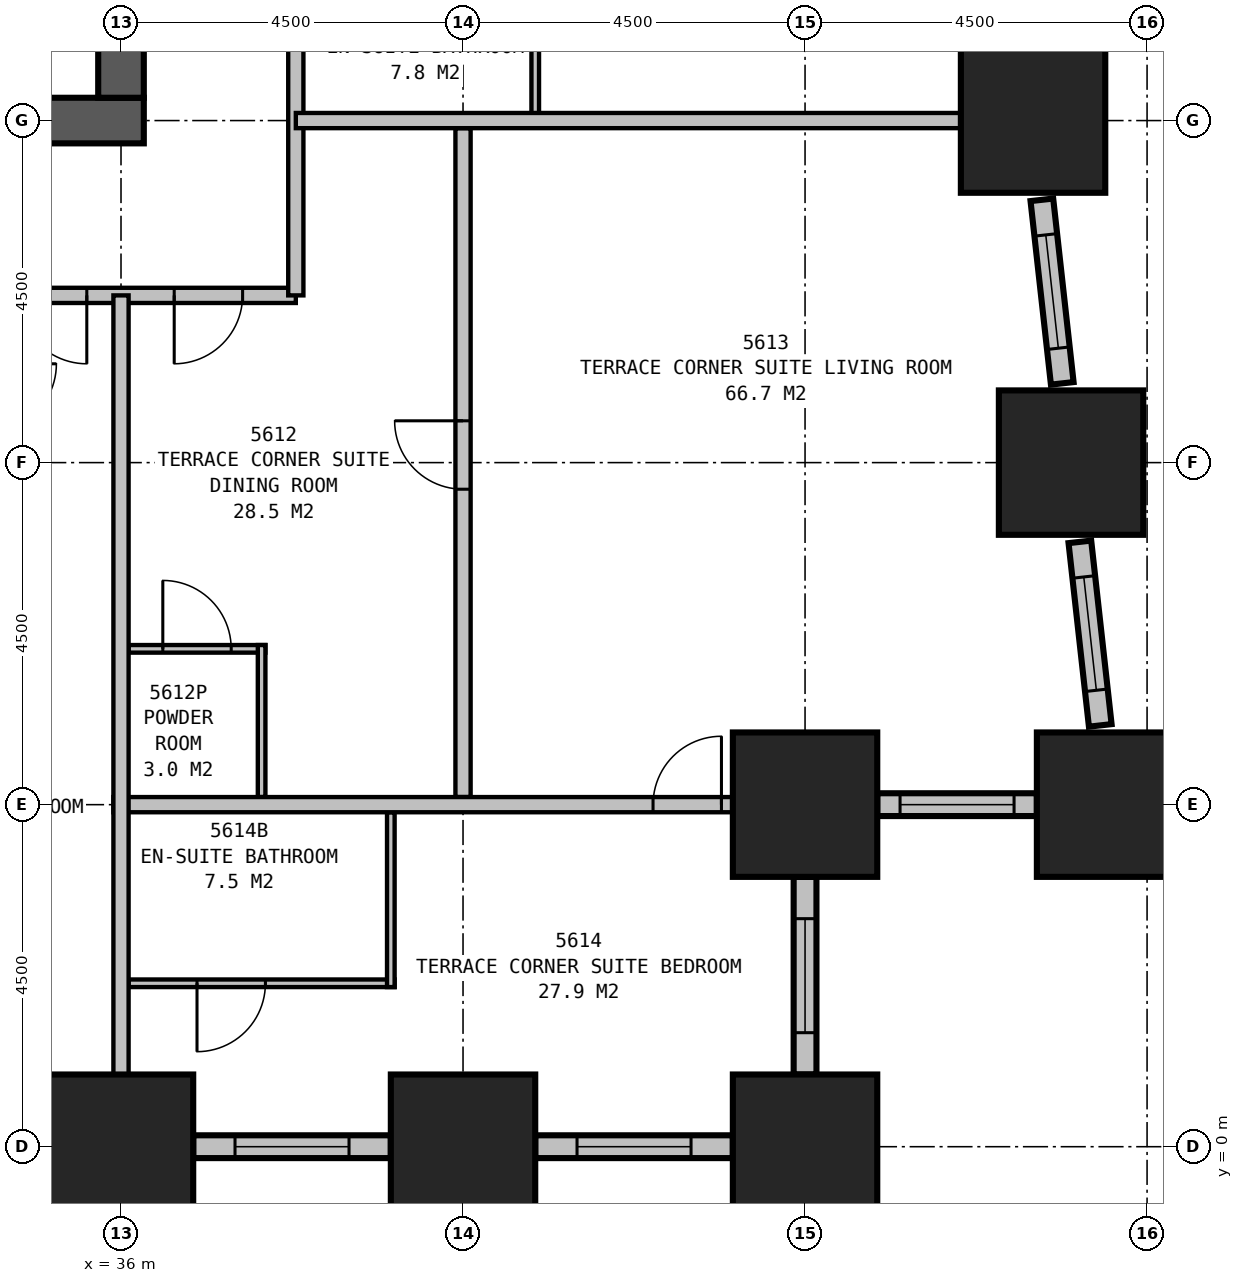
"""IFC4 building model, lengths in metres.
Left out: names, types, materials, properties, quantities, classifications, styles, units other than length and angle.
Written with IfcOpenShell. Run it as: python <this file> out.ifc"""

import sys

from ifc_helpers import new_model, si_unit, direction, frame, frame_2d, origin, origin_2d, place, context, subcontext, project, spatial, rectangle, extrude, element, fill, save


model = new_model("IFC4")
c1 = context("Model", 3, precision=1e-05, world=origin(), true_north=direction((0.0, 1.0)))
c2 = subcontext(c1, "Body", "Model", "MODEL_VIEW")
j1 = project(units=[si_unit("LENGTHUNIT", "METRE"), si_unit("PLANEANGLEUNIT", "RADIAN")], contexts=[c1])
p1 = place(None, origin())
s1 = spatial("IfcSite", under=j1, at=p1, CompositionType="ELEMENT")
p2 = place(p1, origin())
s2 = spatial("IfcBuilding", under=s1, at=p2, CompositionType="ELEMENT")
p3 = place(p2, frame((0.0, 0.0, 217.4)))
s3 = spatial("IfcBuildingStorey", under=s2, at=p3, CompositionType="ELEMENT", Elevation=217.4)
for number, where, z_axis, x_axis in (
    (1, (36.0, 0.0, 0.0), (0.0, 0.0, 1.0), (1.0, 0.0, 0.0)),
    (2, (40.5, 0.0, 0.0), (0.0, 0.0, 1.0), (1.0, 0.0, 0.0)),
    (3, (45.0, 0.0, 0.0), (0.0, 0.0, 1.0), (1.0, 0.0, 0.0)),
    (4, (45.0, 4.5, 0.0), (0.0, 0.0, 1.0), (1.0, 0.0, 0.0)),
    (5, (49.0, 4.5, 0.0), (0.0, 0.0, 1.0), (1.0, 0.0, 0.0)),
    (6, (48.5, 9.0, 0.0), (0.0, 0.0, 1.0), (1.0, 0.0, 0.0)),
    (7, (48.0, 13.5, 0.0), (0.0, 0.0, 1.0), (1.0, 0.0, 0.0)),
):
    element("IfcColumn", number, at=place(p3, frame(where, z_axis=z_axis, x_axis=x_axis)), inside=s3, PredefinedType="COLUMN", context=c2, shape_type="SweptSolid", body=[
        extrude(rectangle(XDim=1.9, YDim=1.9, at=origin_2d()), origin(), (0.0, 0.0, 1.0), 3.9),
    ])
p4 = place(p3, frame((13.2, 13.5, 0.0), z_axis=(0.0, 0.0, 1.0), x_axis=(1.0, 0.0, 0.0)))
e8 = element("IfcWall", 8, at=p4, inside=s3, PredefinedType="SHEAR", context=c2, shape_type="SweptSolid", body=[
    extrude(rectangle(XDim=23.1, YDim=0.6, at=frame_2d((11.55, 0.0))), origin(), (0.0, 0.0, 1.0), 3.9),
])
p5 = place(p3, frame((36.0, 13.8, 0.0), z_axis=(0.0, 0.0, 1.0), x_axis=(0.0, 1.0, 0.0)))
e9 = element("IfcWall", 9, at=p5, inside=s3, PredefinedType="SHEAR", context=c2, shape_type="SweptSolid", body=[
    extrude(rectangle(XDim=2.7, YDim=0.6, at=frame_2d((1.35, 0.0))), origin(), (0.0, 0.0, 1.0), 3.9),
])
p6 = place(p3, frame((36.95, 0.0, 0.0), z_axis=(0.0, 0.0, 1.0), x_axis=(1.0, 0.0, 0.0)))
e10 = element("IfcWall", 10, at=p6, inside=s3, PredefinedType="STANDARD", context=c2, shape_type="SweptSolid", body=[
    extrude(rectangle(XDim=2.6, YDim=0.3, at=frame_2d((1.3, 0.0))), origin(), (0.0, 0.0, 1.0), 2.15),
])
p7 = place(p6, frame((0.55, 0.0, 0.5)))
e11 = element("IfcOpeningElement", 11, at=p7, cuts=e10, PredefinedType="OPENING", context=c2, shape_type="SweptSolid", body=[
    extrude(rectangle(XDim=1.5, YDim=1.5, at=frame_2d((0.75, 0.75))), frame((0.0, 0.16, 0.0), z_axis=(0.0, -1.0, 0.0), x_axis=(1.0, 0.0, 0.0)), (0.0, 0.0, 1.0), 0.32),
])
p8 = place(p3, frame((41.45, 0.0, 0.0), z_axis=(0.0, 0.0, 1.0), x_axis=(1.0, 0.0, 0.0)))
e12 = element("IfcWall", 12, at=p8, inside=s3, PredefinedType="STANDARD", context=c2, shape_type="SweptSolid", body=[
    extrude(rectangle(XDim=2.6, YDim=0.3, at=frame_2d((1.3, 0.0))), origin(), (0.0, 0.0, 1.0), 2.15),
])
p9 = place(p8, frame((0.55, 0.0, 0.5)))
e13 = element("IfcOpeningElement", 13, at=p9, cuts=e12, PredefinedType="OPENING", context=c2, shape_type="SweptSolid", body=[
    extrude(rectangle(XDim=1.5, YDim=1.5, at=frame_2d((0.75, 0.75))), frame((0.0, 0.16, 0.0), z_axis=(0.0, -1.0, 0.0), x_axis=(1.0, 0.0, 0.0)), (0.0, 0.0, 1.0), 0.32),
])
p10 = place(p3, frame((45.0, 0.95, 0.0), z_axis=(0.0, 0.0, 1.0), x_axis=(0.0, 1.0, 0.0)))
e14 = element("IfcWall", 14, at=p10, inside=s3, PredefinedType="STANDARD", context=c2, shape_type="SweptSolid", body=[
    extrude(rectangle(XDim=2.6, YDim=0.3, at=frame_2d((1.3, 0.0))), origin(), (0.0, 0.0, 1.0), 2.15),
])
p11 = place(p10, frame((0.55, 0.0, 0.5)))
e15 = element("IfcOpeningElement", 15, at=p11, cuts=e14, PredefinedType="OPENING", context=c2, shape_type="SweptSolid", body=[
    extrude(rectangle(XDim=1.5, YDim=1.5, at=frame_2d((0.75, 0.75))), frame((0.0, 0.16, 0.0), z_axis=(0.0, -1.0, 0.0), x_axis=(1.0, 0.0, 0.0)), (0.0, 0.0, 1.0), 0.32),
])
p12 = place(p3, frame((45.95, 4.5, 0.0), z_axis=(0.0, 0.0, 1.0), x_axis=(1.0, 0.0, 0.0)))
e16 = element("IfcWall", 16, at=p12, inside=s3, PredefinedType="STANDARD", context=c2, shape_type="SweptSolid", body=[
    extrude(rectangle(XDim=2.1, YDim=0.3, at=frame_2d((1.05, 0.0))), origin(), (0.0, 0.0, 1.0), 2.15),
])
p13 = place(p12, frame((0.3, 0.0, 0.5)))
e17 = element("IfcOpeningElement", 17, at=p13, cuts=e16, PredefinedType="OPENING", context=c2, shape_type="SweptSolid", body=[
    extrude(rectangle(XDim=1.5, YDim=1.5, at=frame_2d((0.75, 0.75))), frame((0.0, 0.16, 0.0), z_axis=(0.0, -1.0, 0.0), x_axis=(1.0, 0.0, 0.0)), (0.0, 0.0, 1.0), 0.32),
])
p14 = place(p3, frame((48.884, 5.543, 0.0), z_axis=(0.0, 0.0, 1.0), x_axis=(-0.110343286306, 0.993893535127, 0.0)))
e18 = element("IfcWall", 18, at=p14, inside=s3, PredefinedType="STANDARD", context=c2, shape_type="SweptSolid", body=[
    extrude(rectangle(XDim=2.429, YDim=0.3, at=frame_2d((1.215, 0.0))), origin(), (0.0, 0.0, 1.0), 2.15),
])
p15 = place(p14, frame((0.465, 0.0, 0.5)))
e19 = element("IfcOpeningElement", 19, at=p15, cuts=e18, PredefinedType="OPENING", context=c2, shape_type="SweptSolid", body=[
    extrude(rectangle(XDim=1.5, YDim=1.5, at=frame_2d((0.75, 0.75))), frame((0.0, 0.16, 0.0), z_axis=(0.0, -1.0, 0.0), x_axis=(1.0, 0.0, 0.0)), (0.0, 0.0, 1.0), 0.32),
])
p16 = place(p3, frame((48.384, 10.043, 0.0), z_axis=(0.0, 0.0, 1.0), x_axis=(-0.110343286306, 0.993893535127, 0.0)))
e20 = element("IfcWall", 20, at=p16, inside=s3, PredefinedType="STANDARD", context=c2, shape_type="SweptSolid", body=[
    extrude(rectangle(XDim=2.429, YDim=0.3, at=frame_2d((1.215, 0.0))), origin(), (0.0, 0.0, 1.0), 2.15),
])
p17 = place(p16, frame((0.465, 0.0, 0.5)))
e21 = element("IfcOpeningElement", 21, at=p17, cuts=e20, PredefinedType="OPENING", context=c2, shape_type="SweptSolid", body=[
    extrude(rectangle(XDim=1.5, YDim=1.5, at=frame_2d((0.75, 0.75))), frame((0.0, 0.16, 0.0), z_axis=(0.0, -1.0, 0.0), x_axis=(1.0, 0.0, 0.0)), (0.0, 0.0, 1.0), 0.32),
])
p18 = place(p3, frame((26.9, 11.2, 0.0), z_axis=(0.0, 0.0, 1.0), x_axis=(1.0, 0.0, 0.0)))
e22 = element("IfcWall", 22, at=p18, inside=s3, PredefinedType="PARTITIONING", context=c2, shape_type="SweptSolid", body=[
    extrude(rectangle(XDim=11.4, YDim=0.2, at=frame_2d((5.7, 0.0))), origin(), (0.0, 0.0, 1.0), 3.65),
])
p19 = place(p18, frame((4.25, 0.0, 0.0), z_axis=(0.0, 0.0, 1.0), x_axis=(-1.0, 0.0, 0.0)))
e23 = element("IfcOpeningElement", 23, at=p19, cuts=e22, PredefinedType="OPENING", context=c2, shape_type="SweptSolid", body=[
    extrude(rectangle(XDim=1.0, YDim=2.1, at=frame_2d((0.5, 1.05))), frame((0.0, 0.11, 0.0), z_axis=(0.0, -1.0, 0.0), x_axis=(1.0, 0.0, 0.0)), (0.0, 0.0, 1.0), 0.22),
])
p20 = place(p18, frame((8.65, 0.0, 0.0), z_axis=(0.0, 0.0, 1.0), x_axis=(-1.0, 0.0, 0.0)))
e24 = element("IfcOpeningElement", 24, at=p20, cuts=e22, PredefinedType="OPENING", context=c2, shape_type="SweptSolid", body=[
    extrude(rectangle(XDim=0.9, YDim=2.1, at=frame_2d((0.45, 1.05))), frame((0.0, 0.11, 0.0), z_axis=(0.0, -1.0, 0.0), x_axis=(1.0, 0.0, 0.0)), (0.0, 0.0, 1.0), 0.22),
])
p21 = place(p18, frame((10.7, 0.0, 0.0), z_axis=(0.0, 0.0, 1.0), x_axis=(-1.0, 0.0, 0.0)))
e25 = element("IfcOpeningElement", 25, at=p21, cuts=e22, PredefinedType="OPENING", context=c2, shape_type="SweptSolid", body=[
    extrude(rectangle(XDim=0.9, YDim=2.1, at=frame_2d((0.45, 1.05))), frame((0.0, 0.11, 0.0), z_axis=(0.0, -1.0, 0.0), x_axis=(1.0, 0.0, 0.0)), (0.0, 0.0, 1.0), 0.22),
])
p22 = place(p3, frame((38.3, 11.2, 0.0), z_axis=(0.0, 0.0, 1.0), x_axis=(0.0, 1.0, 0.0)))
e26 = element("IfcWall", 26, at=p22, inside=s3, PredefinedType="PARTITIONING", context=c2, shape_type="SweptSolid", body=[
    extrude(rectangle(XDim=18.7, YDim=0.2, at=frame_2d((9.35, 0.0))), origin(), (0.0, 0.0, 1.0), 3.65),
])
p23 = place(p22, frame((6.35, 0.0, 0.0), z_axis=(0.0, 0.0, 1.0), x_axis=(-1.0, 0.0, 0.0)))
e27 = element("IfcOpeningElement", 27, at=p23, cuts=e26, PredefinedType="OPENING", context=c2, shape_type="SweptSolid", body=[
    extrude(rectangle(XDim=0.9, YDim=2.1, at=frame_2d((0.45, 1.05))), frame((0.0, 0.11, 0.0), z_axis=(0.0, -1.0, 0.0), x_axis=(1.0, 0.0, 0.0)), (0.0, 0.0, 1.0), 0.22),
])
p24 = place(p22, frame((14.95, 0.0, 0.0), z_axis=(0.0, 0.0, 1.0), x_axis=(-1.0, 0.0, 0.0)))
e28 = element("IfcOpeningElement", 28, at=p24, cuts=e26, PredefinedType="OPENING", context=c2, shape_type="SweptSolid", body=[
    extrude(rectangle(XDim=0.9, YDim=2.1, at=frame_2d((0.45, 1.05))), frame((0.0, 0.11, 0.0), z_axis=(0.0, -1.0, 0.0), x_axis=(1.0, 0.0, 0.0)), (0.0, 0.0, 1.0), 0.22),
])
p25 = place(p3, frame((41.45, 13.5, 0.0), z_axis=(0.0, 0.0, 1.0), x_axis=(0.0, 1.0, 0.0)))
e29 = element("IfcWall", 29, at=p25, inside=s3, PredefinedType="PLUMBINGWALL", context=c2, shape_type="SweptSolid", body=[
    extrude(rectangle(XDim=2.8, YDim=0.1, at=frame_2d((1.4, 0.0))), origin(), (0.0, 0.0, 1.0), 3.65),
])
p26 = place(p3, frame((38.3, 13.5, 0.0), z_axis=(0.0, 0.0, 1.0), x_axis=(1.0, 0.0, 0.0)))
e30 = element("IfcWall", 30, at=p26, inside=s3, PredefinedType="PARTITIONING", context=c2, shape_type="SweptSolid", body=[
    extrude(rectangle(XDim=9.921, YDim=0.2, at=frame_2d((4.96, 0.0))), origin(), (0.0, 0.0, 1.0), 2.35),
])
p27 = place(p3, frame((36.0, 11.2, 0.0), z_axis=(0.0, 0.0, 1.0), x_axis=(0.0, -1.0, 0.0)))
e31 = element("IfcWall", 31, at=p27, inside=s3, PredefinedType="PARTITIONING", context=c2, shape_type="SweptSolid", body=[
    extrude(rectangle(XDim=11.2, YDim=0.2, at=frame_2d((5.6, 0.0))), origin(), (0.0, 0.0, 1.0), 2.65),
])
p28 = place(p3, frame((35.9, 4.5, 0.0), z_axis=(0.0, 0.0, 1.0), x_axis=(1.0, 0.0, 0.0)))
e32 = element("IfcWall", 32, at=p28, inside=s3, PredefinedType="PARTITIONING", context=c2, shape_type="SweptSolid", body=[
    extrude(rectangle(XDim=9.1, YDim=0.2, at=frame_2d((4.55, 0.0))), origin(), (0.0, 0.0, 1.0), 3.65),
])
p29 = place(p28, frame((7.1, 0.0, 0.0)))
e33 = element("IfcOpeningElement", 33, at=p29, cuts=e32, PredefinedType="OPENING", context=c2, shape_type="SweptSolid", body=[
    extrude(rectangle(XDim=0.9, YDim=2.1, at=frame_2d((0.45, 1.05))), frame((0.0, 0.11, 0.0), z_axis=(0.0, -1.0, 0.0), x_axis=(1.0, 0.0, 0.0)), (0.0, 0.0, 1.0), 0.22),
])
p30 = place(p3, frame((40.5, 4.6, 0.0), z_axis=(0.0, 0.0, 1.0), x_axis=(0.0, 1.0, 0.0)))
e34 = element("IfcWall", 34, at=p30, inside=s3, PredefinedType="PARTITIONING", context=c2, shape_type="SweptSolid", body=[
    extrude(rectangle(XDim=8.8, YDim=0.2, at=frame_2d((4.4, 0.0))), origin(), (0.0, 0.0, 1.0), 2.65),
])
p31 = place(p30, frame((4.05, 0.0, 0.0)))
e35 = element("IfcOpeningElement", 35, at=p31, cuts=e34, PredefinedType="OPENING", context=c2, shape_type="SweptSolid", body=[
    extrude(rectangle(XDim=0.9, YDim=2.1, at=frame_2d((0.45, 1.05))), frame((0.0, 0.11, 0.0), z_axis=(0.0, -1.0, 0.0), x_axis=(1.0, 0.0, 0.0)), (0.0, 0.0, 1.0), 0.22),
])
p32 = place(p3, frame((37.85, 4.6, 0.0), z_axis=(0.0, 0.0, 1.0), x_axis=(0.0, 1.0, 0.0)))
e36 = element("IfcWall", 36, at=p32, inside=s3, PredefinedType="PLUMBINGWALL", context=c2, shape_type="SweptSolid", body=[
    extrude(rectangle(XDim=2.0, YDim=0.1, at=frame_2d((1.0, 0.0))), origin(), (0.0, 0.0, 1.0), 3.65),
])
p33 = place(p3, frame((36.1, 6.55, 0.0), z_axis=(0.0, 0.0, 1.0), x_axis=(1.0, 0.0, 0.0)))
e37 = element("IfcWall", 37, at=p33, inside=s3, PredefinedType="PLUMBINGWALL", context=c2, shape_type="SweptSolid", body=[
    extrude(rectangle(XDim=1.8, YDim=0.1, at=frame_2d((0.9, 0.0))), origin(), (0.0, 0.0, 1.0), 3.65),
])
p34 = place(p33, frame((0.45, 0.0, 0.0)))
e38 = element("IfcOpeningElement", 38, at=p34, cuts=e37, PredefinedType="OPENING", context=c2, shape_type="SweptSolid", body=[
    extrude(rectangle(XDim=0.9, YDim=2.1, at=frame_2d((0.45, 1.05))), frame((0.0, 0.06, 0.0), z_axis=(0.0, -1.0, 0.0), x_axis=(1.0, 0.0, 0.0)), (0.0, 0.0, 1.0), 0.12),
])
p35 = place(p3, frame((39.55, 4.4, 0.0), z_axis=(0.0, 0.0, 1.0), x_axis=(0.0, -1.0, 0.0)))
e39 = element("IfcWall", 39, at=p35, inside=s3, PredefinedType="PLUMBINGWALL", context=c2, shape_type="SweptSolid", body=[
    extrude(rectangle(XDim=2.3, YDim=0.1, at=frame_2d((1.15, 0.0))), origin(), (0.0, 0.0, 1.0), 3.65),
])
p36 = place(p3, frame((36.1, 2.15, 0.0), z_axis=(0.0, 0.0, 1.0), x_axis=(1.0, 0.0, 0.0)))
e40 = element("IfcWall", 40, at=p36, inside=s3, PredefinedType="PLUMBINGWALL", context=c2, shape_type="SweptSolid", body=[
    extrude(rectangle(XDim=3.5, YDim=0.1, at=frame_2d((1.75, 0.0))), origin(), (0.0, 0.0, 1.0), 3.65),
])
p37 = place(p36, frame((1.8, 0.0, 0.0), z_axis=(0.0, 0.0, 1.0), x_axis=(-1.0, 0.0, 0.0)))
e41 = element("IfcOpeningElement", 41, at=p37, cuts=e40, PredefinedType="OPENING", context=c2, shape_type="SweptSolid", body=[
    extrude(rectangle(XDim=0.9, YDim=2.1, at=frame_2d((0.45, 1.05))), frame((0.0, 0.06, 0.0), z_axis=(0.0, -1.0, 0.0), x_axis=(1.0, 0.0, 0.0)), (0.0, 0.0, 1.0), 0.12),
])
p38 = place(p7, origin())
e42 = element("IfcWindow", 42, at=p38, inside=s3, PartitioningType="SINGLE_PANEL", PredefinedType="WINDOW", context=c2, shape_type="SweptSolid", body=[
    extrude(rectangle(XDim=1.5, YDim=1.5, at=frame_2d((0.75, 0.75))), frame((0.0, 0.03, 0.0), z_axis=(0.0, -1.0, 0.0), x_axis=(1.0, 0.0, 0.0)), (0.0, 0.0, 1.0), 0.06),
])
fill(e11, e42)
p39 = place(p9, origin())
e43 = element("IfcWindow", 43, at=p39, inside=s3, PartitioningType="SINGLE_PANEL", PredefinedType="WINDOW", context=c2, shape_type="SweptSolid", body=[
    extrude(rectangle(XDim=1.5, YDim=1.5, at=frame_2d((0.75, 0.75))), frame((0.0, 0.03, 0.0), z_axis=(0.0, -1.0, 0.0), x_axis=(1.0, 0.0, 0.0)), (0.0, 0.0, 1.0), 0.06),
])
fill(e13, e43)
p40 = place(p11, origin())
e44 = element("IfcWindow", 44, at=p40, inside=s3, PartitioningType="SINGLE_PANEL", PredefinedType="WINDOW", context=c2, shape_type="SweptSolid", body=[
    extrude(rectangle(XDim=1.5, YDim=1.5, at=frame_2d((0.75, 0.75))), frame((0.0, 0.03, 0.0), z_axis=(0.0, -1.0, 0.0), x_axis=(1.0, 0.0, 0.0)), (0.0, 0.0, 1.0), 0.06),
])
fill(e15, e44)
p41 = place(p13, origin())
e45 = element("IfcWindow", 45, at=p41, inside=s3, PartitioningType="SINGLE_PANEL", PredefinedType="WINDOW", context=c2, shape_type="SweptSolid", body=[
    extrude(rectangle(XDim=1.5, YDim=1.5, at=frame_2d((0.75, 0.75))), frame((0.0, 0.03, 0.0), z_axis=(0.0, -1.0, 0.0), x_axis=(1.0, 0.0, 0.0)), (0.0, 0.0, 1.0), 0.06),
])
fill(e17, e45)
p42 = place(p15, origin())
e46 = element("IfcWindow", 46, at=p42, inside=s3, PartitioningType="SINGLE_PANEL", PredefinedType="WINDOW", context=c2, shape_type="SweptSolid", body=[
    extrude(rectangle(XDim=1.5, YDim=1.5, at=frame_2d((0.75, 0.75))), frame((0.0, 0.03, 0.0), z_axis=(0.0, -1.0, 0.0), x_axis=(1.0, 0.0, 0.0)), (0.0, 0.0, 1.0), 0.06),
])
fill(e19, e46)
p43 = place(p17, origin())
e47 = element("IfcWindow", 47, at=p43, inside=s3, PartitioningType="SINGLE_PANEL", PredefinedType="WINDOW", context=c2, shape_type="SweptSolid", body=[
    extrude(rectangle(XDim=1.5, YDim=1.5, at=frame_2d((0.75, 0.75))), frame((0.0, 0.03, 0.0), z_axis=(0.0, -1.0, 0.0), x_axis=(1.0, 0.0, 0.0)), (0.0, 0.0, 1.0), 0.06),
])
fill(e21, e47)
p44 = place(p20, origin())
e48 = element("IfcDoor", 48, at=p44, inside=s3, OperationType="SINGLE_SWING_LEFT", PredefinedType="DOOR", context=c2, shape_type="SweptSolid", body=[
    extrude(rectangle(XDim=0.9, YDim=2.1, at=frame_2d((0.45, 1.05))), frame((0.0, 0.025, 0.0), z_axis=(0.0, -1.0, 0.0), x_axis=(1.0, 0.0, 0.0)), (0.0, 0.0, 1.0), 0.05),
])
fill(e24, e48)
p45 = place(p21, origin())
e49 = element("IfcDoor", 49, at=p45, inside=s3, OperationType="SINGLE_SWING_RIGHT", PredefinedType="DOOR", context=c2, shape_type="SweptSolid", body=[
    extrude(rectangle(XDim=0.9, YDim=2.1, at=frame_2d((0.45, 1.05))), frame((0.0, 0.025, 0.0), z_axis=(0.0, -1.0, 0.0), x_axis=(1.0, 0.0, 0.0)), (0.0, 0.0, 1.0), 0.05),
])
fill(e25, e49)
p46 = place(p29, origin())
e50 = element("IfcDoor", 50, at=p46, inside=s3, OperationType="SINGLE_SWING_RIGHT", PredefinedType="DOOR", context=c2, shape_type="SweptSolid", body=[
    extrude(rectangle(XDim=0.9, YDim=2.1, at=frame_2d((0.45, 1.05))), frame((0.0, 0.025, 0.0), z_axis=(0.0, -1.0, 0.0), x_axis=(1.0, 0.0, 0.0)), (0.0, 0.0, 1.0), 0.05),
])
fill(e33, e50)
p47 = place(p31, origin())
e51 = element("IfcDoor", 51, at=p47, inside=s3, OperationType="SINGLE_SWING_RIGHT", PredefinedType="DOOR", context=c2, shape_type="SweptSolid", body=[
    extrude(rectangle(XDim=0.9, YDim=2.1, at=frame_2d((0.45, 1.05))), frame((0.0, 0.025, 0.0), z_axis=(0.0, -1.0, 0.0), x_axis=(1.0, 0.0, 0.0)), (0.0, 0.0, 1.0), 0.05),
])
fill(e35, e51)
p48 = place(p34, origin())
e52 = element("IfcDoor", 52, at=p48, inside=s3, OperationType="SINGLE_SWING_LEFT", PredefinedType="DOOR", context=c2, shape_type="SweptSolid", body=[
    extrude(rectangle(XDim=0.9, YDim=2.1, at=frame_2d((0.45, 1.05))), frame((0.0, 0.025, 0.0), z_axis=(0.0, -1.0, 0.0), x_axis=(1.0, 0.0, 0.0)), (0.0, 0.0, 1.0), 0.05),
])
fill(e38, e52)
p49 = place(p37, origin())
e53 = element("IfcDoor", 53, at=p49, inside=s3, OperationType="SINGLE_SWING_RIGHT", PredefinedType="DOOR", context=c2, shape_type="SweptSolid", body=[
    extrude(rectangle(XDim=0.9, YDim=2.1, at=frame_2d((0.45, 1.05))), frame((0.0, 0.025, 0.0), z_axis=(0.0, -1.0, 0.0), x_axis=(1.0, 0.0, 0.0)), (0.0, 0.0, 1.0), 0.05),
])
fill(e41, e53)
save(model, sys.argv[1])
